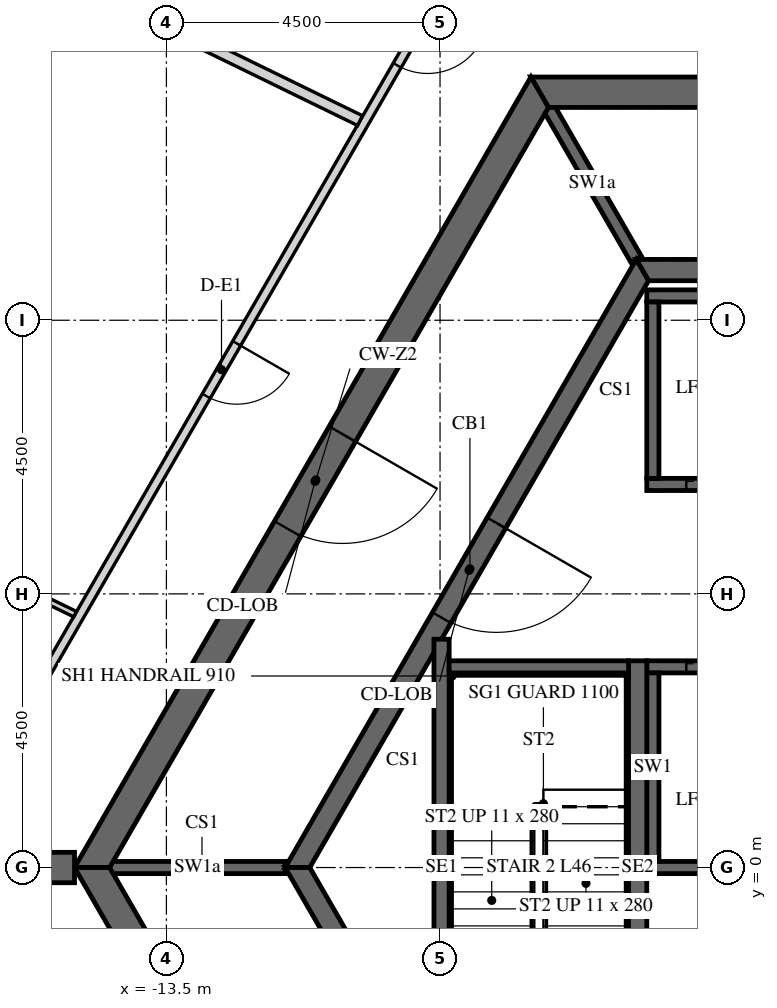
"""IFC4 building model, lengths in metres.
Left out: names, types, materials, properties, quantities, classifications, styles, units other than length and angle.
Written with IfcOpenShell. Run it as: python <this file> out.ifc"""

import sys

from ifc_helpers import new_model, si_unit, direction, frame, frame_2d, origin, place, context, subcontext, project, spatial, polyline, rectangle, outline, extrude, element, fill, save


model = new_model("IFC4")
c1 = context("Model", 3, precision=1e-05, world=origin(), true_north=direction((0.0, 1.0)))
c2 = subcontext(c1, "Body", "Model", "MODEL_VIEW")
j1 = project(units=[si_unit("LENGTHUNIT", "METRE"), si_unit("PLANEANGLEUNIT", "RADIAN")], contexts=[c1])
p1 = place(None, origin())
s1 = spatial("IfcSite", under=j1, at=p1, CompositionType="ELEMENT")
p2 = place(p1, origin())
s2 = spatial("IfcBuilding", under=s1, at=p2, CompositionType="ELEMENT")
p3 = place(p2, frame((0.0, 0.0, 195.6)))
s3 = spatial("IfcBuildingStorey", under=s2, at=p3, CompositionType="ELEMENT", Elevation=195.6)
p4 = place(p3, frame((-7.361, 12.75, -0.15), z_axis=(0.0, 0.0, 1.0), x_axis=(-0.50000571537, -0.866022103989, 0.0)))
e1 = element("IfcWall", 1, at=p4, inside=s3, PredefinedType="SHEAR", context=c2, shape_type="SweptSolid", body=[
    extrude(outline(polyline([(-0.144, -0.25), (14.867, -0.25), (14.578, 0.25), (0.144, 0.25), (-0.144, -0.25)])), origin(), (0.0, 0.0, 1.0), 3.9),
])
p5 = place(p4, frame((6.49, 0.0, 0.15)))
e2 = element("IfcOpeningElement", 2, at=p5, cuts=e1, PredefinedType="OPENING", context=c2, shape_type="SweptSolid", body=[
    extrude(rectangle(XDim=1.8, YDim=2.4, at=frame_2d((0.9, 1.2))), frame((0.0, 0.26, 0.0), z_axis=(0.0, -1.0, 0.0), x_axis=(1.0, 0.0, 0.0)), (0.0, 0.0, 1.0), 0.52),
])
p6 = place(p3, frame((-14.722, 0.0, -0.15), z_axis=(0.0, 0.0, 1.0), x_axis=(0.50000571537, -0.866022103989, 0.0)))
e3 = element("IfcWall", 3, at=p6, inside=s3, PredefinedType="SHEAR", context=c2, shape_type="SweptSolid", body=[
    extrude(outline(polyline([(-0.144, -0.25), (14.867, -0.25), (14.578, 0.25), (0.144, 0.25), (-0.144, -0.25)])), origin(), (0.0, 0.0, 1.0), 3.9),
])
p7 = place(p6, frame((6.432, 0.0, 0.15)))
e4 = element("IfcOpeningElement", 4, at=p7, cuts=e3, PredefinedType="OPENING", context=c2, shape_type="SweptSolid", body=[
    extrude(rectangle(XDim=1.8, YDim=2.4, at=frame_2d((0.9, 1.2))), frame((0.0, 0.26, 0.0), z_axis=(0.0, -1.0, 0.0), x_axis=(1.0, 0.0, 0.0)), (0.0, 0.0, 1.0), 0.52),
])
p8 = place(p3, frame((7.361, 12.75, -0.15), z_axis=(0.0, 0.0, 1.0), x_axis=(-1.0, 0.0, 0.0)))
e5 = element("IfcWall", 5, at=p8, inside=s3, PredefinedType="SHEAR", context=c2, shape_type="SweptSolid", body=[
    extrude(outline(polyline([(-0.144, -0.25), (14.866, -0.25), (14.578, 0.25), (0.144, 0.25), (-0.144, -0.25)])), origin(), (0.0, 0.0, 1.0), 3.9),
])
p9 = place(p8, frame((6.761, 0.0, 0.15)))
e6 = element("IfcOpeningElement", 6, at=p9, cuts=e5, PredefinedType="OPENING", context=c2, shape_type="SweptSolid", body=[
    extrude(rectangle(XDim=1.2, YDim=2.4, at=frame_2d((0.6, 1.2))), frame((0.0, 0.26, 0.0), z_axis=(0.0, -1.0, 0.0), x_axis=(1.0, 0.0, 0.0)), (0.0, 0.0, 1.0), 0.52),
])
p10 = place(p3, frame((-15.011, 0.0, -0.15), z_axis=(0.0, 0.0, 1.0), x_axis=(-1.0, 0.0, 0.0)))
e7 = element("IfcWall", 7, at=p10, inside=s3, PredefinedType="SHEAR", context=c2, shape_type="SweptSolid", body=[
    extrude(rectangle(XDim=15.424, YDim=0.5, at=frame_2d((7.712, 0.0))), origin(), (0.0, 0.0, 1.0), 3.9),
])
p11 = place(p10, frame((6.812, 0.0, 0.15)))
e8 = element("IfcOpeningElement", 8, at=p11, cuts=e7, PredefinedType="OPENING", context=c2, shape_type="SweptSolid", body=[
    extrude(rectangle(XDim=1.8, YDim=2.4, at=frame_2d((0.9, 1.2))), frame((0.0, 0.26, 0.0), z_axis=(0.0, -1.0, 0.0), x_axis=(1.0, 0.0, 0.0)), (0.0, 0.0, 1.0), 0.52),
])
p12 = place(p3, frame((-5.673, 9.825, -0.15), z_axis=(0.0, 0.0, 1.0), x_axis=(-0.499995046907, -0.866028263435, 0.0)))
e9 = element("IfcWall", 9, at=p12, inside=s3, PredefinedType="SHEAR", context=c2, shape_type="SweptSolid", body=[
    extrude(outline(polyline([(-0.101, -0.175), (11.446, -0.175), (11.244, 0.175), (0.101, 0.175), (-0.101, -0.175)])), origin(), (0.0, 0.0, 1.0), 3.9),
])
p13 = place(p12, frame((4.801, 0.0, 0.15)))
e10 = element("IfcOpeningElement", 10, at=p13, cuts=e9, PredefinedType="OPENING", context=c2, shape_type="SweptSolid", body=[
    extrude(rectangle(XDim=1.8, YDim=2.4, at=frame_2d((0.9, 1.2))), frame((0.0, 0.185, 0.0), z_axis=(0.0, -1.0, 0.0), x_axis=(1.0, 0.0, 0.0)), (0.0, 0.0, 1.0), 0.37),
])
p14 = place(p3, frame((-11.345, 0.0, -0.15), z_axis=(0.0, 0.0, 1.0), x_axis=(0.499995046907, -0.866028263435, 0.0)))
e11 = element("IfcWall", 11, at=p14, inside=s3, PredefinedType="SHEAR", context=c2, shape_type="SweptSolid", body=[
    extrude(outline(polyline([(-0.101, -0.175), (11.446, -0.175), (11.244, 0.175), (0.101, 0.175), (-0.101, -0.175)])), origin(), (0.0, 0.0, 1.0), 3.9),
])
p15 = place(p14, frame((4.744, 0.0, 0.15)))
e12 = element("IfcOpeningElement", 12, at=p15, cuts=e11, PredefinedType="OPENING", context=c2, shape_type="SweptSolid", body=[
    extrude(rectangle(XDim=1.8, YDim=2.4, at=frame_2d((0.9, 1.2))), frame((0.0, 0.185, 0.0), z_axis=(0.0, -1.0, 0.0), x_axis=(1.0, 0.0, 0.0)), (0.0, 0.0, 1.0), 0.37),
])
p16 = place(p3, frame((5.673, 9.825, -0.15), z_axis=(0.0, 0.0, 1.0), x_axis=(-1.0, 0.0, 0.0)))
e13 = element("IfcWall", 13, at=p16, inside=s3, PredefinedType="SHEAR", context=c2, shape_type="SweptSolid", body=[
    extrude(outline(polyline([(-0.101, -0.175), (11.446, -0.175), (11.244, 0.175), (0.101, 0.175), (-0.101, -0.175)])), origin(), (0.0, 0.0, 1.0), 3.9),
])
p17 = place(p3, frame((-5.6, 6.3, -0.25), z_axis=(0.0, 0.0, 1.0), x_axis=(1.0, 0.0, 0.0)))
e14 = element("IfcWall", 14, at=p17, inside=s3, PredefinedType="SHEAR", context=c2, shape_type="SweptSolid", body=[
    extrude(rectangle(XDim=11.2, YDim=0.2, at=frame_2d((5.6, 0.0))), origin(), (0.0, 0.0, 1.0), 3.9),
])
p18 = place(p17, frame((8.45, 0.0, 0.25)))
e15 = element("IfcOpeningElement", 15, at=p18, cuts=e14, PredefinedType="OPENING", context=c2, shape_type="SweptSolid", body=[
    extrude(rectangle(XDim=0.9, YDim=2.1, at=frame_2d((0.45, 1.05))), frame((0.0, 0.11, 0.0), z_axis=(0.0, -1.0, 0.0), x_axis=(1.0, 0.0, 0.0)), (0.0, 0.0, 1.0), 0.22),
])
p19 = place(p17, frame((0.65, 0.0, 0.25)))
e16 = element("IfcOpeningElement", 16, at=p19, cuts=e14, PredefinedType="OPENING", context=c2, shape_type="SweptSolid", body=[
    extrude(rectangle(XDim=1.1, YDim=2.1, at=frame_2d((0.55, 1.05))), frame((0.0, 0.11, 0.0), z_axis=(0.0, -1.0, 0.0), x_axis=(1.0, 0.0, 0.0)), (0.0, 0.0, 1.0), 0.22),
])
p20 = place(p17, frame((2.85, 0.0, 0.25)))
e17 = element("IfcOpeningElement", 17, at=p20, cuts=e14, PredefinedType="OPENING", context=c2, shape_type="SweptSolid", body=[
    extrude(rectangle(XDim=1.1, YDim=2.1, at=frame_2d((0.55, 1.05))), frame((0.0, 0.11, 0.0), z_axis=(0.0, -1.0, 0.0), x_axis=(1.0, 0.0, 0.0)), (0.0, 0.0, 1.0), 0.22),
])
p21 = place(p17, frame((5.05, 0.0, 0.25)))
e18 = element("IfcOpeningElement", 18, at=p21, cuts=e14, PredefinedType="OPENING", context=c2, shape_type="SweptSolid", body=[
    extrude(rectangle(XDim=1.1, YDim=2.1, at=frame_2d((0.55, 1.05))), frame((0.0, 0.11, 0.0), z_axis=(0.0, -1.0, 0.0), x_axis=(1.0, 0.0, 0.0)), (0.0, 0.0, 1.0), 0.22),
])
p22 = place(p3, frame((-5.6, 9.4, -0.25), z_axis=(0.0, 0.0, 1.0), x_axis=(1.0, 0.0, 0.0)))
e19 = element("IfcWall", 19, at=p22, inside=s3, PredefinedType="SHEAR", context=c2, shape_type="SweptSolid", body=[
    extrude(rectangle(XDim=11.2, YDim=0.2, at=frame_2d((5.6, 0.0))), origin(), (0.0, 0.0, 1.0), 3.9),
])
p23 = place(p3, frame((-5.5, 6.4, -0.25), z_axis=(0.0, 0.0, 1.0), x_axis=(0.0, 1.0, 0.0)))
e20 = element("IfcWall", 20, at=p23, inside=s3, PredefinedType="SHEAR", context=c2, shape_type="SweptSolid", body=[
    extrude(rectangle(XDim=2.9, YDim=0.2, at=frame_2d((1.45, 0.0))), origin(), (0.0, 0.0, 1.0), 3.9),
])
p24 = place(p3, frame((-5.6, 3.3, -0.25), z_axis=(0.0, 0.0, 1.0), x_axis=(1.0, 0.0, 0.0)))
e21 = element("IfcWall", 21, at=p24, inside=s3, PredefinedType="SHEAR", context=c2, shape_type="SweptSolid", body=[
    extrude(rectangle(XDim=11.2, YDim=0.2, at=frame_2d((5.6, 0.0))), origin(), (0.0, 0.0, 1.0), 3.9),
])
p25 = place(p24, frame((0.65, 0.0, 0.25)))
e22 = element("IfcOpeningElement", 22, at=p25, cuts=e21, PredefinedType="OPENING", context=c2, shape_type="SweptSolid", body=[
    extrude(rectangle(XDim=1.1, YDim=2.1, at=frame_2d((0.55, 1.05))), frame((0.0, 0.11, 0.0), z_axis=(0.0, -1.0, 0.0), x_axis=(1.0, 0.0, 0.0)), (0.0, 0.0, 1.0), 0.22),
])
p26 = place(p24, frame((2.85, 0.0, 0.25)))
e23 = element("IfcOpeningElement", 23, at=p26, cuts=e21, PredefinedType="OPENING", context=c2, shape_type="SweptSolid", body=[
    extrude(rectangle(XDim=1.1, YDim=2.1, at=frame_2d((0.55, 1.05))), frame((0.0, 0.11, 0.0), z_axis=(0.0, -1.0, 0.0), x_axis=(1.0, 0.0, 0.0)), (0.0, 0.0, 1.0), 0.22),
])
p27 = place(p24, frame((5.05, 0.0, 0.25)))
e24 = element("IfcOpeningElement", 24, at=p27, cuts=e21, PredefinedType="OPENING", context=c2, shape_type="SweptSolid", body=[
    extrude(rectangle(XDim=1.1, YDim=2.1, at=frame_2d((0.55, 1.05))), frame((0.0, 0.11, 0.0), z_axis=(0.0, -1.0, 0.0), x_axis=(1.0, 0.0, 0.0)), (0.0, 0.0, 1.0), 0.22),
])
p28 = place(p24, frame((7.25, 0.0, 0.25)))
e25 = element("IfcOpeningElement", 25, at=p28, cuts=e21, PredefinedType="OPENING", context=c2, shape_type="SweptSolid", body=[
    extrude(rectangle(XDim=1.1, YDim=2.1, at=frame_2d((0.55, 1.05))), frame((0.0, 0.11, 0.0), z_axis=(0.0, -1.0, 0.0), x_axis=(1.0, 0.0, 0.0)), (0.0, 0.0, 1.0), 0.22),
])
p29 = place(p24, frame((9.45, 0.0, 0.25)))
e26 = element("IfcOpeningElement", 26, at=p29, cuts=e21, PredefinedType="OPENING", context=c2, shape_type="SweptSolid", body=[
    extrude(rectangle(XDim=1.1, YDim=2.1, at=frame_2d((0.55, 1.05))), frame((0.0, 0.11, 0.0), z_axis=(0.0, -1.0, 0.0), x_axis=(1.0, 0.0, 0.0)), (0.0, 0.0, 1.0), 0.22),
])
p30 = place(p3, frame((-5.6, 0.0, -0.25), z_axis=(0.0, 0.0, 1.0), x_axis=(1.0, 0.0, 0.0)))
e27 = element("IfcWall", 27, at=p30, inside=s3, PredefinedType="SHEAR", context=c2, shape_type="SweptSolid", body=[
    extrude(rectangle(XDim=11.2, YDim=0.2, at=frame_2d((5.6, 0.0))), origin(), (0.0, 0.0, 1.0), 3.9),
])
p31 = place(p3, frame((-5.5, 0.1, -0.25), z_axis=(0.0, 0.0, 1.0), x_axis=(0.0, 1.0, 0.0)))
e28 = element("IfcWall", 28, at=p31, inside=s3, PredefinedType="SHEAR", context=c2, shape_type="SweptSolid", body=[
    extrude(rectangle(XDim=3.1, YDim=0.2, at=frame_2d((1.55, 0.0))), origin(), (0.0, 0.0, 1.0), 3.9),
])
for number, where, z_axis, x_axis in (
    (29, (-5.773, 10.0, -0.15), (0.0, 0.0, 1.0), (-0.5, 0.866, 0.0)),
    (30, (-11.547, 0.0, -0.15), (0.0, 0.0, 1.0), (-1.0, 0.0, 0.0)),
):
    element("IfcWall", number, at=place(p3, frame(where, z_axis=z_axis, x_axis=x_axis)), inside=s3, PredefinedType="SHEAR", context=c2, shape_type="SweptSolid", body=[
        extrude(rectangle(XDim=2.887, YDim=0.2, at=frame_2d((1.443, 0.0))), origin(), (0.0, 0.0, 1.0), 3.9),
    ])
p32 = place(p3, frame((-5.75, -3.4, -0.25), z_axis=(0.0, 0.0, 1.0), x_axis=(0.0, 1.0, 0.0)))
e31 = element("IfcWall", 31, at=p32, inside=s3, PredefinedType="SHEAR", context=c2, shape_type="SweptSolid", body=[
    extrude(rectangle(XDim=6.8, YDim=0.3, at=frame_2d((3.4, 0.0))), origin(), (0.0, 0.0, 1.0), 3.9),
])
p33 = place(p3, frame((-8.975, -3.755, -0.25), z_axis=(0.0, 0.0, 1.0), x_axis=(0.0, 1.0, 0.0)))
e32 = element("IfcWall", 32, at=p33, inside=s3, PredefinedType="SHEAR", context=c2, shape_type="SweptSolid", body=[
    extrude(rectangle(XDim=7.51, YDim=0.25, at=frame_2d((3.755, 0.0))), origin(), (0.0, 0.0, 1.0), 3.9),
])
p34 = place(p3, frame((-8.85, 3.3, -0.25), z_axis=(0.0, 0.0, 1.0), x_axis=(1.0, 0.0, 0.0)))
e33 = element("IfcWall", 33, at=p34, inside=s3, PredefinedType="SHEAR", context=c2, shape_type="SweptSolid", body=[
    extrude(rectangle(XDim=2.95, YDim=0.2, at=frame_2d((1.475, 0.0))), origin(), (0.0, 0.0, 1.0), 3.9),
])
p35 = place(p3, frame((-8.704, 14.925, 0.0), z_axis=(0.0, 0.0, 1.0), x_axis=(-0.500001272756, -0.866024668957, 0.0)))
e34 = element("IfcWall", 34, at=p35, inside=s3, PredefinedType="PARTITIONING", context=c2, shape_type="SweptSolid", body=[
    extrude(rectangle(XDim=14.78, YDim=0.15, at=frame_2d((7.39, 0.0))), origin(), (0.0, 0.0, 1.0), 2.988),
])
p36 = place(p35, frame((1.001, 0.0, 0.0)))
e35 = element("IfcOpeningElement", 35, at=p36, cuts=e34, PredefinedType="OPENING", context=c2, shape_type="SweptSolid", body=[
    extrude(rectangle(XDim=1.0, YDim=2.1, at=frame_2d((0.5, 1.05))), frame((0.0, 0.085, 0.0), z_axis=(0.0, -1.0, 0.0), x_axis=(1.0, 0.0, 0.0)), (0.0, 0.0, 1.0), 0.17),
])
p37 = place(p35, frame((7.281, 0.0, 0.0)))
e36 = element("IfcOpeningElement", 36, at=p37, cuts=e34, PredefinedType="OPENING", context=c2, shape_type="SweptSolid", body=[
    extrude(rectangle(XDim=1.0, YDim=2.1, at=frame_2d((0.5, 1.05))), frame((0.0, 0.085, 0.0), z_axis=(0.0, -1.0, 0.0), x_axis=(1.0, 0.0, 0.0)), (0.0, 0.0, 1.0), 0.17),
])
p38 = place(p3, frame((-21.815, 17.892, 0.0), z_axis=(0.0, 0.0, 1.0), x_axis=(0.898799253997, -0.438360469265, 0.0)))
e37 = element("IfcWall", 37, at=p38, inside=s3, PredefinedType="PARTITIONING", context=c2, shape_type="SweptSolid", body=[
    extrude(rectangle(XDim=12.794, YDim=0.18, at=frame_2d((6.397, 0.0))), origin(), (0.0, 0.0, 1.0), 2.988),
])
p39 = place(p3, frame((-17.367, 5.32, 0.0), z_axis=(0.0, 0.0, 1.0), x_axis=(0.898798752769, -0.438361496965, 0.0)))
e38 = element("IfcWall", 38, at=p39, inside=s3, PredefinedType="PARTITIONING", context=c2, shape_type="SweptSolid", body=[
    extrude(rectangle(XDim=2.632, YDim=0.1, at=frame_2d((1.316, 0.0))), origin(), (0.0, 0.0, 1.0), 2.988),
])
p40 = place(p39, frame((1.05, 0.0, 0.0)))
e39 = element("IfcOpeningElement", 39, at=p40, cuts=e38, PredefinedType="OPENING", context=c2, shape_type="SweptSolid", body=[
    extrude(rectangle(XDim=0.8, YDim=2.1, at=frame_2d((0.4, 1.05))), frame((0.0, 0.06, 0.0), z_axis=(0.0, -1.0, 0.0), x_axis=(1.0, 0.0, 0.0)), (0.0, 0.0, 1.0), 0.12),
])
p41 = place(p5, origin())
e40 = element("IfcDoor", 40, at=p41, inside=s3, OperationType="DOUBLE_DOOR_SINGLE_SWING", PredefinedType="DOOR", context=c2, shape_type="SweptSolid", body=[
    extrude(rectangle(XDim=1.8, YDim=2.4, at=frame_2d((0.9, 1.2))), frame((0.0, 0.025, 0.0), z_axis=(0.0, -1.0, 0.0), x_axis=(1.0, 0.0, 0.0)), (0.0, 0.0, 1.0), 0.05),
])
fill(e2, e40)
p42 = place(p13, origin())
e41 = element("IfcDoor", 41, at=p42, inside=s3, OperationType="DOUBLE_DOOR_SINGLE_SWING", PredefinedType="DOOR", context=c2, shape_type="SweptSolid", body=[
    extrude(rectangle(XDim=1.8, YDim=2.4, at=frame_2d((0.9, 1.2))), frame((0.0, 0.025, 0.0), z_axis=(0.0, -1.0, 0.0), x_axis=(1.0, 0.0, 0.0)), (0.0, 0.0, 1.0), 0.05),
])
fill(e10, e41)
p43 = place(p19, origin())
e42 = element("IfcDoor", 42, at=p43, inside=s3, OperationType="SLIDING_TO_LEFT", PredefinedType="DOOR", context=c2, shape_type="SweptSolid", body=[
    extrude(rectangle(XDim=1.1, YDim=2.1, at=frame_2d((0.55, 1.05))), frame((0.0, 0.025, 0.0), z_axis=(0.0, -1.0, 0.0), x_axis=(1.0, 0.0, 0.0)), (0.0, 0.0, 1.0), 0.05),
])
fill(e16, e42)
p44 = place(p25, origin())
e43 = element("IfcDoor", 43, at=p44, inside=s3, OperationType="SLIDING_TO_LEFT", PredefinedType="DOOR", context=c2, shape_type="SweptSolid", body=[
    extrude(rectangle(XDim=1.1, YDim=2.1, at=frame_2d((0.55, 1.05))), frame((0.0, 0.025, 0.0), z_axis=(0.0, -1.0, 0.0), x_axis=(1.0, 0.0, 0.0)), (0.0, 0.0, 1.0), 0.05),
])
fill(e22, e43)
p45 = place(p36, origin())
e44 = element("IfcDoor", 44, at=p45, inside=s3, OperationType="SINGLE_SWING_RIGHT", PredefinedType="DOOR", context=c2, shape_type="SweptSolid", body=[
    extrude(rectangle(XDim=1.0, YDim=2.1, at=frame_2d((0.5, 1.05))), frame((0.0, 0.025, 0.0), z_axis=(0.0, -1.0, 0.0), x_axis=(1.0, 0.0, 0.0)), (0.0, 0.0, 1.0), 0.05),
])
fill(e35, e44)
p46 = place(p37, origin())
e45 = element("IfcDoor", 45, at=p46, inside=s3, OperationType="SINGLE_SWING_RIGHT", PredefinedType="DOOR", context=c2, shape_type="SweptSolid", body=[
    extrude(rectangle(XDim=1.0, YDim=2.1, at=frame_2d((0.5, 1.05))), frame((0.0, 0.025, 0.0), z_axis=(0.0, -1.0, 0.0), x_axis=(1.0, 0.0, 0.0)), (0.0, 0.0, 1.0), 0.05),
])
fill(e36, e45)
save(model, sys.argv[1])
